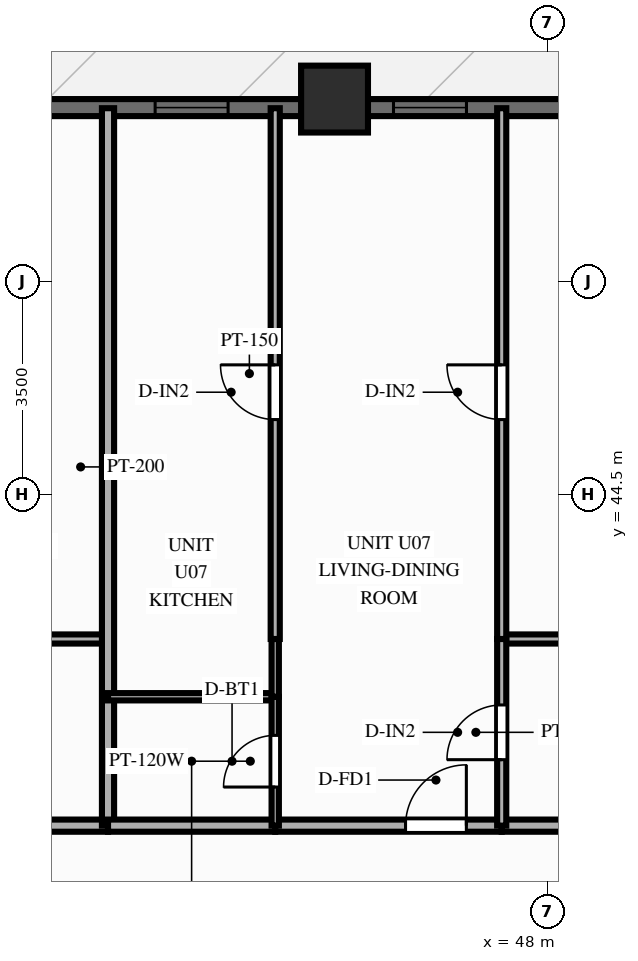
"""IFC4 building model, lengths in metres.
Left out: names, types, materials, properties, quantities, classifications, styles, units other than length and angle.
Written with IfcOpenShell. Run it as: python <this file> out.ifc"""

import sys

from ifc_helpers import new_model, si_unit, direction, frame, frame_2d, origin, origin_2d, place, context, subcontext, project, spatial, rectangle, extrude, source, transform, mapped, element, fill, save


model = new_model("IFC4")
c1 = context("Model", 3, precision=1e-05, world=origin(), true_north=direction((0.0, 1.0)))
c2 = subcontext(c1, "Body", "Model", "MODEL_VIEW")
j1 = project(units=[si_unit("LENGTHUNIT", "METRE"), si_unit("PLANEANGLEUNIT", "RADIAN")], contexts=[c1])
p1 = place(None, origin())
s1 = spatial("IfcSite", under=j1, at=p1, CompositionType="ELEMENT")
p2 = place(p1, origin())
s2 = spatial("IfcBuilding", under=s1, at=p2, CompositionType="ELEMENT")
p3 = place(p2, frame((0.0, 0.0, 43.4)))
s3 = spatial("IfcBuildingStorey", under=s2, at=p3, CompositionType="ELEMENT", Elevation=43.4)
m1 = source(origin(), c2, "Body", "SweptSolid", [
    extrude(rectangle(XDim=1.1, YDim=1.1, at=origin_2d()), origin(), (0.0, 0.0, 1.0), 3.0),
])
p4 = place(p3, frame((44.5, 51.0, 0.0), z_axis=(0.0, 0.0, 1.0), x_axis=(1.0, 0.0, 0.0)))
e1 = element("IfcColumn", 1, at=p4, inside=s3, PredefinedType="COLUMN", context=c2, shape_type="MappedRepresentation", body=[
    mapped(m1, transform((0.0, 0.0, 0.0), scale=1.0)),
])
p5 = place(p3, frame((15.5, 50.86, 0.0), z_axis=(0.0, 0.0, 1.0), x_axis=(1.0, 0.0, 0.0)))
e2 = element("IfcWall", 2, at=p5, inside=s3, PredefinedType="SOLIDWALL", context=c2, shape_type="SweptSolid", body=[
    extrude(rectangle(XDim=45.0, YDim=0.28, at=frame_2d((22.5, 0.0))), origin(), (0.0, 0.0, 1.0), 2.28),
])
p6 = place(p5, frame((0.76, 0.0, 0.25)))
e3 = element("IfcOpeningElement", 3, at=p6, cuts=e2, PredefinedType="OPENING", context=c2, shape_type="SweptSolid", body=[
    extrude(rectangle(XDim=1.2, YDim=1.5, at=frame_2d((0.6, 0.75))), frame((0.0, 0.152, 0.0), z_axis=(0.0, -1.0, 0.0), x_axis=(1.0, 0.0, 0.0)), (0.0, 0.0, 1.0), 0.304),
])
p7 = place(p5, frame((3.105, 0.0, 0.25)))
e4 = element("IfcOpeningElement", 4, at=p7, cuts=e2, PredefinedType="OPENING", context=c2, shape_type="SweptSolid", body=[
    extrude(rectangle(XDim=1.2, YDim=1.5, at=frame_2d((0.6, 0.75))), frame((0.0, 0.152, 0.0), z_axis=(0.0, -1.0, 0.0), x_axis=(1.0, 0.0, 0.0)), (0.0, 0.0, 1.0), 0.304),
])
p8 = place(p5, frame((6.98, 0.0, 0.25)))
e5 = element("IfcOpeningElement", 5, at=p8, cuts=e2, PredefinedType="OPENING", context=c2, shape_type="SweptSolid", body=[
    extrude(rectangle(XDim=1.2, YDim=1.5, at=frame_2d((0.6, 0.75))), frame((0.0, 0.152, 0.0), z_axis=(0.0, -1.0, 0.0), x_axis=(1.0, 0.0, 0.0)), (0.0, 0.0, 1.0), 0.304),
])
p9 = place(p5, frame((11.341, 0.0, 0.25)))
e6 = element("IfcOpeningElement", 6, at=p9, cuts=e2, PredefinedType="OPENING", context=c2, shape_type="SweptSolid", body=[
    extrude(rectangle(XDim=1.2, YDim=1.5, at=frame_2d((0.6, 0.75))), frame((0.0, 0.152, 0.0), z_axis=(0.0, -1.0, 0.0), x_axis=(1.0, 0.0, 0.0)), (0.0, 0.0, 1.0), 0.304),
])
p10 = place(p5, frame((14.231, 0.0, 0.25)))
e7 = element("IfcOpeningElement", 7, at=p10, cuts=e2, PredefinedType="OPENING", context=c2, shape_type="SweptSolid", body=[
    extrude(rectangle(XDim=0.95, YDim=1.5, at=frame_2d((0.475, 0.75))), frame((0.0, 0.152, 0.0), z_axis=(0.0, -1.0, 0.0), x_axis=(1.0, 0.0, 0.0)), (0.0, 0.0, 1.0), 0.304),
])
p11 = place(p5, frame((18.502, 0.0, 0.0)))
e8 = element("IfcOpeningElement", 8, at=p11, cuts=e2, PredefinedType="OPENING", context=c2, shape_type="SweptSolid", body=[
    extrude(rectangle(XDim=1.1, YDim=2.15, at=frame_2d((0.55, 1.075))), frame((0.0, 0.152, 0.0), z_axis=(0.0, -1.0, 0.0), x_axis=(1.0, 0.0, 0.0)), (0.0, 0.0, 1.0), 0.304),
])
p12 = place(p5, frame((22.813, 0.0, 0.25)))
e9 = element("IfcOpeningElement", 9, at=p12, cuts=e2, PredefinedType="OPENING", context=c2, shape_type="SweptSolid", body=[
    extrude(rectangle(XDim=1.2, YDim=1.5, at=frame_2d((0.6, 0.75))), frame((0.0, 0.152, 0.0), z_axis=(0.0, -1.0, 0.0), x_axis=(1.0, 0.0, 0.0)), (0.0, 0.0, 1.0), 0.304),
])
p13 = place(p5, frame((26.05, 0.0, 0.25)))
e10 = element("IfcOpeningElement", 10, at=p13, cuts=e2, PredefinedType="OPENING", context=c2, shape_type="SweptSolid", body=[
    extrude(rectangle(XDim=1.2, YDim=1.5, at=frame_2d((0.6, 0.75))), frame((0.0, 0.152, 0.0), z_axis=(0.0, -1.0, 0.0), x_axis=(1.0, 0.0, 0.0)), (0.0, 0.0, 1.0), 0.304),
])
p14 = place(p5, frame((29.97, 0.0, 0.25)))
e11 = element("IfcOpeningElement", 11, at=p14, cuts=e2, PredefinedType="OPENING", context=c2, shape_type="SweptSolid", body=[
    extrude(rectangle(XDim=1.2, YDim=1.5, at=frame_2d((0.6, 0.75))), frame((0.0, 0.152, 0.0), z_axis=(0.0, -1.0, 0.0), x_axis=(1.0, 0.0, 0.0)), (0.0, 0.0, 1.0), 0.304),
])
p15 = place(p5, frame((33.011, 0.0, 0.25)))
e12 = element("IfcOpeningElement", 12, at=p15, cuts=e2, PredefinedType="OPENING", context=c2, shape_type="SweptSolid", body=[
    extrude(rectangle(XDim=1.2, YDim=1.5, at=frame_2d((0.6, 0.75))), frame((0.0, 0.152, 0.0), z_axis=(0.0, -1.0, 0.0), x_axis=(1.0, 0.0, 0.0)), (0.0, 0.0, 1.0), 0.304),
])
p16 = place(p5, frame((36.181, 0.0, 0.25)))
e13 = element("IfcOpeningElement", 13, at=p16, cuts=e2, PredefinedType="OPENING", context=c2, shape_type="SweptSolid", body=[
    extrude(rectangle(XDim=1.2, YDim=1.5, at=frame_2d((0.6, 0.75))), frame((0.0, 0.152, 0.0), z_axis=(0.0, -1.0, 0.0), x_axis=(1.0, 0.0, 0.0)), (0.0, 0.0, 1.0), 0.304),
])
p17 = place(p5, frame((39.079, 0.0, 0.25)))
e14 = element("IfcOpeningElement", 14, at=p17, cuts=e2, PredefinedType="OPENING", context=c2, shape_type="SweptSolid", body=[
    extrude(rectangle(XDim=1.2, YDim=1.5, at=frame_2d((0.6, 0.75))), frame((0.0, 0.152, 0.0), z_axis=(0.0, -1.0, 0.0), x_axis=(1.0, 0.0, 0.0)), (0.0, 0.0, 1.0), 0.304),
])
p18 = place(p5, frame((42.339, 0.0, 0.25)))
e15 = element("IfcOpeningElement", 15, at=p18, cuts=e2, PredefinedType="OPENING", context=c2, shape_type="SweptSolid", body=[
    extrude(rectangle(XDim=1.2, YDim=1.5, at=frame_2d((0.6, 0.75))), frame((0.0, 0.152, 0.0), z_axis=(0.0, -1.0, 0.0), x_axis=(1.0, 0.0, 0.0)), (0.0, 0.0, 1.0), 0.304),
])
p19 = place(p3, frame((37.052, 39.05, 0.0), z_axis=(0.0, 0.0, 1.0), x_axis=(1.0, 0.0, 0.0)))
e16 = element("IfcWall", 16, at=p19, inside=s3, PredefinedType="PARTITIONING", context=c2, shape_type="SweptSolid", body=[
    extrude(rectangle(XDim=3.723, YDim=0.2, at=frame_2d((1.861, 0.0))), origin(), (0.0, 0.0, 1.0), 2.79),
])
p20 = place(p3, frame((37.052, 42.12, 0.0), z_axis=(0.0, 0.0, 1.0), x_axis=(1.0, 0.0, 0.0)))
e17 = element("IfcWall", 17, at=p20, inside=s3, PredefinedType="PARTITIONING", context=c2, shape_type="SweptSolid", body=[
    extrude(rectangle(XDim=3.723, YDim=0.15, at=frame_2d((1.861, 0.0))), origin(), (0.0, 0.0, 1.0), 2.79),
])
p21 = place(p3, frame((40.775, 39.05, 0.0), z_axis=(0.0, 0.0, 1.0), x_axis=(0.0, 1.0, 0.0)))
e18 = element("IfcWall", 18, at=p21, inside=s3, PredefinedType="PARTITIONING", context=c2, shape_type="SweptSolid", body=[
    extrude(rectangle(XDim=11.8, YDim=0.2, at=frame_2d((5.9, 0.0))), origin(), (0.0, 0.0, 1.0), 2.79),
])
p22 = place(p3, frame((40.775, 39.05, 0.0), z_axis=(0.0, 0.0, 1.0), x_axis=(1.0, 0.0, 0.0)))
e19 = element("IfcWall", 19, at=p22, inside=s3, PredefinedType="PARTITIONING", context=c2, shape_type="SweptSolid", body=[
    extrude(rectangle(XDim=2.75, YDim=0.2, at=frame_2d((1.375, 0.0))), origin(), (0.0, 0.0, 1.0), 2.79),
])
p23 = place(p3, frame((43.525, 39.05, 0.0), z_axis=(0.0, 0.0, 1.0), x_axis=(1.0, 0.0, 0.0)))
e20 = element("IfcWall", 20, at=p23, inside=s3, PredefinedType="PARTITIONING", context=c2, shape_type="SweptSolid", body=[
    extrude(rectangle(XDim=3.725, YDim=0.2, at=frame_2d((1.862, 0.0))), origin(), (0.0, 0.0, 1.0), 2.79),
])
p24 = place(p23, frame((2.143, 0.0, 0.0)))
e21 = element("IfcOpeningElement", 21, at=p24, cuts=e20, PredefinedType="OPENING", context=c2, shape_type="SweptSolid", body=[
    extrude(rectangle(XDim=1.0, YDim=2.15, at=frame_2d((0.5, 1.075))), frame((0.0, 0.112, 0.0), z_axis=(0.0, -1.0, 0.0), x_axis=(1.0, 0.0, 0.0)), (0.0, 0.0, 1.0), 0.224),
])
p25 = place(p3, frame((47.25, 39.05, 0.0), z_axis=(0.0, 0.0, 1.0), x_axis=(1.0, 0.0, 0.0)))
e22 = element("IfcWall", 22, at=p25, inside=s3, PredefinedType="PARTITIONING", context=c2, shape_type="SweptSolid", body=[
    extrude(rectangle(XDim=3.723, YDim=0.2, at=frame_2d((1.861, 0.0))), origin(), (0.0, 0.0, 1.0), 2.79),
])
p26 = place(p3, frame((40.775, 41.17, 0.0), z_axis=(0.0, 0.0, 1.0), x_axis=(1.0, 0.0, 0.0)))
e23 = element("IfcWall", 23, at=p26, inside=s3, PredefinedType="PARTITIONING", context=c2, shape_type="SweptSolid", body=[
    extrude(rectangle(XDim=2.75, YDim=0.12, at=frame_2d((1.375, 0.0))), origin(), (0.0, 0.0, 1.0), 2.79),
])
p27 = place(p3, frame((47.25, 42.12, 0.0), z_axis=(0.0, 0.0, 1.0), x_axis=(1.0, 0.0, 0.0)))
e24 = element("IfcWall", 24, at=p27, inside=s3, PredefinedType="PARTITIONING", context=c2, shape_type="SweptSolid", body=[
    extrude(rectangle(XDim=3.723, YDim=0.15, at=frame_2d((1.861, 0.0))), origin(), (0.0, 0.0, 1.0), 2.79),
])
p28 = place(p3, frame((43.525, 39.05, 0.0), z_axis=(0.0, 0.0, 1.0), x_axis=(0.0, 1.0, 0.0)))
e25 = element("IfcWall", 25, at=p28, inside=s3, PredefinedType="PARTITIONING", context=c2, shape_type="SweptSolid", body=[
    extrude(rectangle(XDim=2.12, YDim=0.12, at=frame_2d((1.06, 0.0))), origin(), (0.0, 0.0, 1.0), 2.79),
])
p29 = place(p28, frame((0.635, 0.0, 0.0)))
e26 = element("IfcOpeningElement", 26, at=p29, cuts=e25, PredefinedType="OPENING", context=c2, shape_type="SweptSolid", body=[
    extrude(rectangle(XDim=0.85, YDim=2.05, at=frame_2d((0.425, 1.025))), frame((0.0, 0.072, 0.0), z_axis=(0.0, -1.0, 0.0), x_axis=(1.0, 0.0, 0.0)), (0.0, 0.0, 1.0), 0.144),
])
p30 = place(p3, frame((43.525, 41.17, 0.0), z_axis=(0.0, 0.0, 1.0), x_axis=(0.0, 1.0, 0.0)))
e27 = element("IfcWall", 27, at=p30, inside=s3, PredefinedType="PARTITIONING", context=c2, shape_type="SweptSolid", body=[
    extrude(rectangle(XDim=0.95, YDim=0.12, at=frame_2d((0.475, 0.0))), origin(), (0.0, 0.0, 1.0), 2.79),
])
p31 = place(p3, frame((43.525, 42.12, 0.0), z_axis=(0.0, 0.0, 1.0), x_axis=(0.0, 1.0, 0.0)))
e28 = element("IfcWall", 28, at=p31, inside=s3, PredefinedType="PARTITIONING", context=c2, shape_type="SweptSolid", body=[
    extrude(rectangle(XDim=8.73, YDim=0.15, at=frame_2d((4.365, 0.0))), origin(), (0.0, 0.0, 1.0), 2.79),
])
p32 = place(p31, frame((3.609, 0.0, 0.0)))
e29 = element("IfcOpeningElement", 29, at=p32, cuts=e28, PredefinedType="OPENING", context=c2, shape_type="SweptSolid", body=[
    extrude(rectangle(XDim=0.9, YDim=2.1, at=frame_2d((0.45, 1.05))), frame((0.0, 0.087, 0.0), z_axis=(0.0, -1.0, 0.0), x_axis=(1.0, 0.0, 0.0)), (0.0, 0.0, 1.0), 0.174),
])
p33 = place(p3, frame((47.25, 39.05, 0.0), z_axis=(0.0, 0.0, 1.0), x_axis=(0.0, 1.0, 0.0)))
e30 = element("IfcWall", 30, at=p33, inside=s3, PredefinedType="PARTITIONING", context=c2, shape_type="SweptSolid", body=[
    extrude(rectangle(XDim=3.07, YDim=0.15, at=frame_2d((1.535, 0.0))), origin(), (0.0, 0.0, 1.0), 2.79),
])
p34 = place(p33, frame((1.085, 0.0, 0.0)))
e31 = element("IfcOpeningElement", 31, at=p34, cuts=e30, PredefinedType="OPENING", context=c2, shape_type="SweptSolid", body=[
    extrude(rectangle(XDim=0.9, YDim=2.1, at=frame_2d((0.45, 1.05))), frame((0.0, 0.087, 0.0), z_axis=(0.0, -1.0, 0.0), x_axis=(1.0, 0.0, 0.0)), (0.0, 0.0, 1.0), 0.174),
])
p35 = place(p3, frame((47.25, 42.12, 0.0), z_axis=(0.0, 0.0, 1.0), x_axis=(0.0, 1.0, 0.0)))
e32 = element("IfcWall", 32, at=p35, inside=s3, PredefinedType="PARTITIONING", context=c2, shape_type="SweptSolid", body=[
    extrude(rectangle(XDim=8.73, YDim=0.15, at=frame_2d((4.365, 0.0))), origin(), (0.0, 0.0, 1.0), 2.79),
])
p36 = place(p35, frame((3.609, 0.0, 0.0)))
e33 = element("IfcOpeningElement", 33, at=p36, cuts=e32, PredefinedType="OPENING", context=c2, shape_type="SweptSolid", body=[
    extrude(rectangle(XDim=0.9, YDim=2.1, at=frame_2d((0.45, 1.05))), frame((0.0, 0.087, 0.0), z_axis=(0.0, -1.0, 0.0), x_axis=(1.0, 0.0, 0.0)), (0.0, 0.0, 1.0), 0.174),
])
m2 = source(origin(), c2, "Body", "SweptSolid", [
    extrude(rectangle(XDim=1.2, YDim=1.5, at=frame_2d((0.6, 0.75))), frame((0.0, 0.03, 0.0), z_axis=(0.0, -1.0, 0.0), x_axis=(1.0, 0.0, 0.0)), (0.0, 0.0, 1.0), 0.06),
])
p37 = place(p13, origin())
e34 = element("IfcWindow", 34, at=p37, inside=s3, PartitioningType="SINGLE_PANEL", PredefinedType="WINDOW", context=c2, shape_type="MappedRepresentation", body=[
    mapped(m2, transform((0.0, 0.0, 0.0), scale=1.0)),
])
fill(e10, e34)
p38 = place(p14, origin())
e35 = element("IfcWindow", 35, at=p38, inside=s3, PartitioningType="SINGLE_PANEL", PredefinedType="WINDOW", context=c2, shape_type="MappedRepresentation", body=[
    mapped(m2, transform((0.0, 0.0, 0.0), scale=1.0)),
])
fill(e11, e35)
m3 = source(origin(), c2, "Body", "SweptSolid", [
    extrude(rectangle(XDim=1.0, YDim=2.15, at=frame_2d((0.5, 1.075))), frame((0.0, 0.025, 0.0), z_axis=(0.0, -1.0, 0.0), x_axis=(1.0, 0.0, 0.0)), (0.0, 0.0, 1.0), 0.05),
])
p39 = place(p24, origin())
e36 = element("IfcDoor", 36, at=p39, inside=s3, OperationType="SINGLE_SWING_RIGHT", PredefinedType="DOOR", context=c2, shape_type="MappedRepresentation", body=[
    mapped(m3, transform((0.0, 0.0, 0.0), scale=1.0)),
])
fill(e21, e36)
m4 = source(origin(), c2, "Body", "SweptSolid", [
    extrude(rectangle(XDim=0.85, YDim=2.05, at=frame_2d((0.425, 1.025))), frame((0.0, 0.025, 0.0), z_axis=(0.0, -1.0, 0.0), x_axis=(1.0, 0.0, 0.0)), (0.0, 0.0, 1.0), 0.05),
])
p40 = place(p29, origin())
e37 = element("IfcDoor", 37, at=p40, inside=s3, OperationType="SINGLE_SWING_LEFT", PredefinedType="DOOR", context=c2, shape_type="MappedRepresentation", body=[
    mapped(m4, transform((0.0, 0.0, 0.0), scale=1.0)),
])
fill(e26, e37)
m5 = source(origin(), c2, "Body", "SweptSolid", [
    extrude(rectangle(XDim=0.9, YDim=2.1, at=frame_2d((0.45, 1.05))), frame((0.0, 0.025, 0.0), z_axis=(0.0, -1.0, 0.0), x_axis=(1.0, 0.0, 0.0)), (0.0, 0.0, 1.0), 0.05),
])
p41 = place(p32, origin())
e38 = element("IfcDoor", 38, at=p41, inside=s3, OperationType="SINGLE_SWING_RIGHT", PredefinedType="DOOR", context=c2, shape_type="MappedRepresentation", body=[
    mapped(m5, transform((0.0, 0.0, 0.0), scale=1.0)),
])
fill(e29, e38)
p42 = place(p34, origin())
e39 = element("IfcDoor", 39, at=p42, inside=s3, OperationType="SINGLE_SWING_LEFT", PredefinedType="DOOR", context=c2, shape_type="MappedRepresentation", body=[
    mapped(m5, transform((0.0, 0.0, 0.0), scale=1.0)),
])
fill(e31, e39)
p43 = place(p36, origin())
e40 = element("IfcDoor", 40, at=p43, inside=s3, OperationType="SINGLE_SWING_RIGHT", PredefinedType="DOOR", context=c2, shape_type="MappedRepresentation", body=[
    mapped(m5, transform((0.0, 0.0, 0.0), scale=1.0)),
])
fill(e33, e40)
save(model, sys.argv[1])
